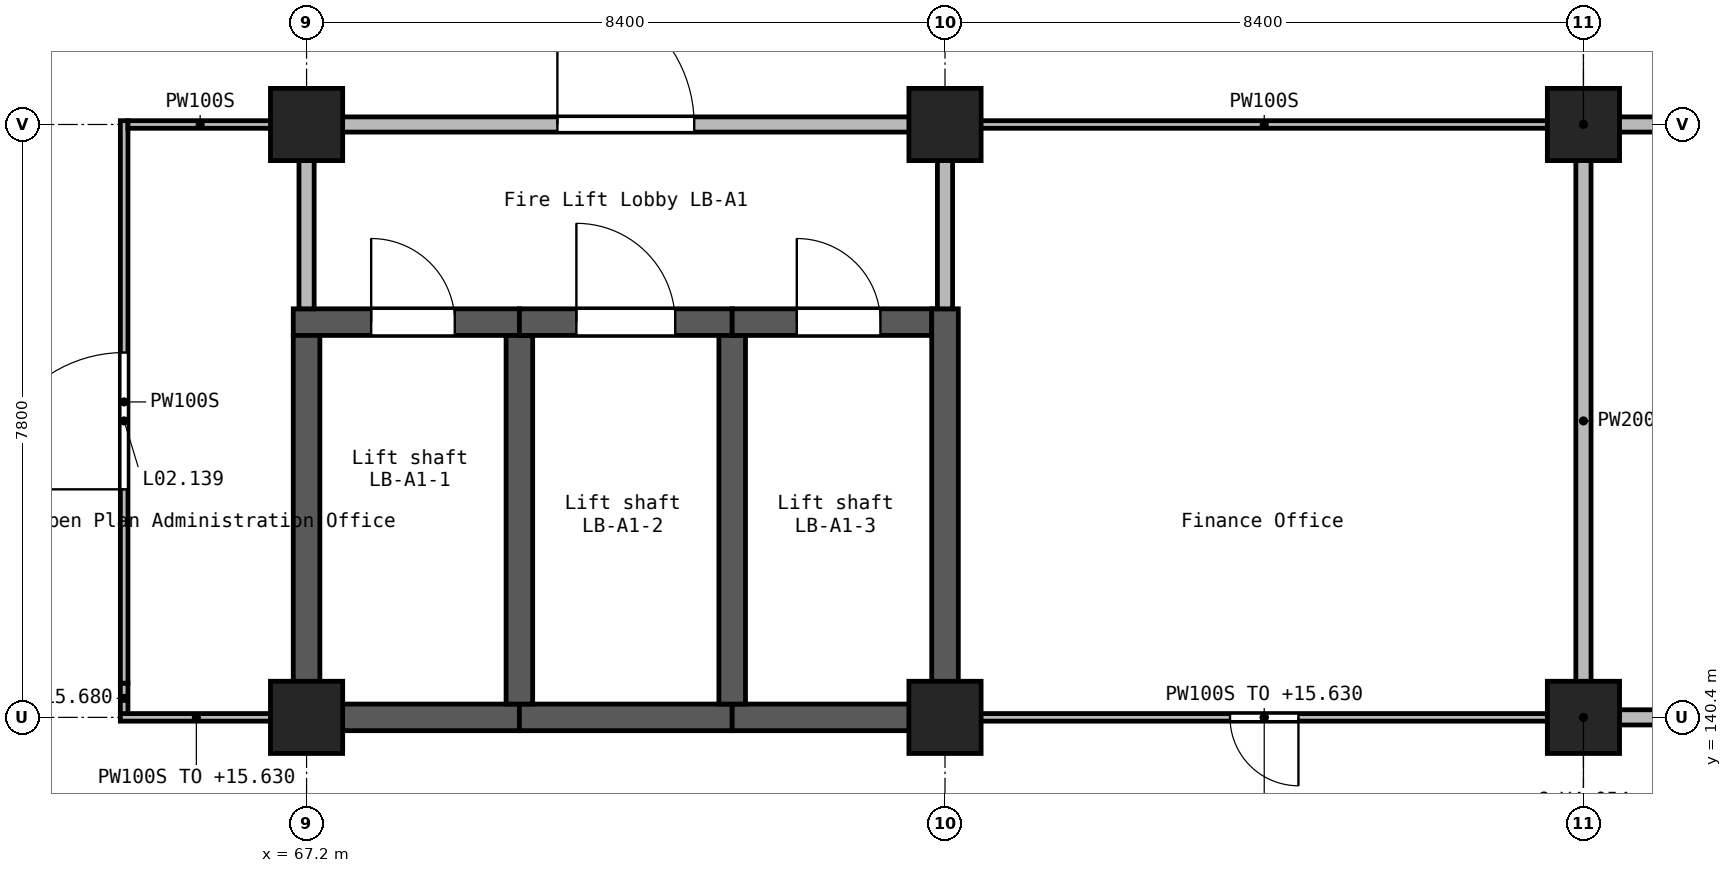
"""IFC4 building model, lengths in metres.
Left out: names, types, materials, properties, quantities, classifications, styles, units other than length and angle.
Written with IfcOpenShell. Run it as: python <this file> out.ifc"""

import sys

from ifc_helpers import new_model, si_unit, direction, frame, frame_2d, origin, origin_2d, place, context, subcontext, project, spatial, rectangle, extrude, element, fill, save


model = new_model("IFC4")
c1 = context("Model", 3, precision=1e-05, world=origin(), true_north=direction((0.0, 1.0)))
c2 = subcontext(c1, "Body", "Model", "MODEL_VIEW")
j1 = project(units=[si_unit("LENGTHUNIT", "METRE"), si_unit("PLANEANGLEUNIT", "RADIAN")], contexts=[c1])
p1 = place(None, origin())
s1 = spatial("IfcSite", under=j1, at=p1, CompositionType="ELEMENT")
p2 = place(p1, origin())
s2 = spatial("IfcBuilding", under=s1, at=p2, CompositionType="ELEMENT")
p3 = place(p2, frame((0.0, 0.0, 12.6)))
s3 = spatial("IfcBuildingStorey", under=s2, at=p3, CompositionType="ELEMENT", Elevation=12.6)
for number, where, z_axis, x_axis in (
    (1, (67.2, 140.4, 0.0), (0.0, 0.0, 1.0), (1.0, 0.0, 0.0)),
    (2, (67.2, 148.2, 0.0), (0.0, 0.0, 1.0), (1.0, 0.0, 0.0)),
    (3, (75.6, 140.4, 0.0), (0.0, 0.0, 1.0), (1.0, 0.0, 0.0)),
    (4, (75.6, 148.2, 0.0), (0.0, 0.0, 1.0), (1.0, 0.0, 0.0)),
    (5, (84.0, 140.4, 0.0), (0.0, 0.0, 1.0), (1.0, 0.0, 0.0)),
    (6, (84.0, 148.2, 0.0), (0.0, 0.0, 1.0), (1.0, 0.0, 0.0)),
):
    element("IfcColumn", number, at=place(p3, frame(where, z_axis=z_axis, x_axis=x_axis)), inside=s3, PredefinedType="COLUMN", context=c2, shape_type="SweptSolid", body=[
        extrude(rectangle(XDim=0.95, YDim=0.95, at=origin_2d()), origin(), (0.0, 0.0, 1.0), 4.2),
    ])
p4 = place(p3, frame((67.025, 145.6, 0.0), z_axis=(0.0, 0.0, 1.0), x_axis=(1.0, 0.0, 0.0)))
e7 = element("IfcWall", 7, at=p4, inside=s3, PredefinedType="SHEAR", context=c2, shape_type="SweptSolid", body=[
    extrude(rectangle(XDim=2.975, YDim=0.35, at=frame_2d((1.488, 0.0))), origin(), (0.0, 0.0, 1.0), 4.2),
])
p5 = place(p4, frame((1.025, 0.0, 0.0)))
e8 = element("IfcOpeningElement", 8, at=p5, cuts=e7, PredefinedType="OPENING", context=c2, shape_type="SweptSolid", body=[
    extrude(rectangle(XDim=1.1, YDim=2.1, at=frame_2d((0.55, 1.05))), frame((0.0, 0.185, 0.0), z_axis=(0.0, -1.0, 0.0), x_axis=(1.0, 0.0, 0.0)), (0.0, 0.0, 1.0), 0.37),
])
p6 = place(p3, frame((67.2, 140.225, 0.0), z_axis=(0.0, 0.0, 1.0), x_axis=(0.0, 1.0, 0.0)))
e9 = element("IfcWall", 9, at=p6, inside=s3, PredefinedType="SHEAR", context=c2, shape_type="SweptSolid", body=[
    extrude(rectangle(XDim=5.2, YDim=0.35, at=frame_2d((2.6, 0.0))), origin(), (0.0, 0.0, 1.0), 4.2),
])
p7 = place(p3, frame((67.375, 140.4, 0.0), z_axis=(0.0, 0.0, 1.0), x_axis=(1.0, 0.0, 0.0)))
e10 = element("IfcWall", 10, at=p7, inside=s3, PredefinedType="SHEAR", context=c2, shape_type="SweptSolid", body=[
    extrude(rectangle(XDim=2.625, YDim=0.35, at=frame_2d((1.312, 0.0))), origin(), (0.0, 0.0, 1.0), 4.2),
])
p8 = place(p3, frame((70.0, 140.4, 0.0), z_axis=(0.0, 0.0, 1.0), x_axis=(1.0, 0.0, 0.0)))
e11 = element("IfcWall", 11, at=p8, inside=s3, PredefinedType="SHEAR", context=c2, shape_type="SweptSolid", body=[
    extrude(rectangle(XDim=2.8, YDim=0.35, at=frame_2d((1.4, 0.0))), origin(), (0.0, 0.0, 1.0), 4.2),
])
p9 = place(p3, frame((70.0, 140.575, 0.0), z_axis=(0.0, 0.0, 1.0), x_axis=(0.0, 1.0, 0.0)))
e12 = element("IfcWall", 12, at=p9, inside=s3, PredefinedType="SHEAR", context=c2, shape_type="SweptSolid", body=[
    extrude(rectangle(XDim=4.85, YDim=0.35, at=frame_2d((2.425, 0.0))), origin(), (0.0, 0.0, 1.0), 4.2),
])
p10 = place(p3, frame((70.0, 145.6, 0.0), z_axis=(0.0, 0.0, 1.0), x_axis=(1.0, 0.0, 0.0)))
e13 = element("IfcWall", 13, at=p10, inside=s3, PredefinedType="SHEAR", context=c2, shape_type="SweptSolid", body=[
    extrude(rectangle(XDim=2.8, YDim=0.35, at=frame_2d((1.4, 0.0))), origin(), (0.0, 0.0, 1.0), 4.2),
])
p11 = place(p10, frame((0.75, 0.0, 0.0)))
e14 = element("IfcOpeningElement", 14, at=p11, cuts=e13, PredefinedType="OPENING", context=c2, shape_type="SweptSolid", body=[
    extrude(rectangle(XDim=1.3, YDim=2.1, at=frame_2d((0.65, 1.05))), frame((0.0, 0.185, 0.0), z_axis=(0.0, -1.0, 0.0), x_axis=(1.0, 0.0, 0.0)), (0.0, 0.0, 1.0), 0.37),
])
p12 = place(p3, frame((72.8, 140.4, 0.0), z_axis=(0.0, 0.0, 1.0), x_axis=(1.0, 0.0, 0.0)))
e15 = element("IfcWall", 15, at=p12, inside=s3, PredefinedType="SHEAR", context=c2, shape_type="SweptSolid", body=[
    extrude(rectangle(XDim=2.625, YDim=0.35, at=frame_2d((1.312, 0.0))), origin(), (0.0, 0.0, 1.0), 4.2),
])
p13 = place(p3, frame((72.8, 140.575, 0.0), z_axis=(0.0, 0.0, 1.0), x_axis=(0.0, 1.0, 0.0)))
e16 = element("IfcWall", 16, at=p13, inside=s3, PredefinedType="SHEAR", context=c2, shape_type="SweptSolid", body=[
    extrude(rectangle(XDim=4.85, YDim=0.35, at=frame_2d((2.425, 0.0))), origin(), (0.0, 0.0, 1.0), 4.2),
])
p14 = place(p3, frame((72.8, 145.6, 0.0), z_axis=(0.0, 0.0, 1.0), x_axis=(1.0, 0.0, 0.0)))
e17 = element("IfcWall", 17, at=p14, inside=s3, PredefinedType="SHEAR", context=c2, shape_type="SweptSolid", body=[
    extrude(rectangle(XDim=2.625, YDim=0.35, at=frame_2d((1.312, 0.0))), origin(), (0.0, 0.0, 1.0), 4.2),
])
p15 = place(p14, frame((0.85, 0.0, 0.0)))
e18 = element("IfcOpeningElement", 18, at=p15, cuts=e17, PredefinedType="OPENING", context=c2, shape_type="SweptSolid", body=[
    extrude(rectangle(XDim=1.1, YDim=2.1, at=frame_2d((0.55, 1.05))), frame((0.0, 0.185, 0.0), z_axis=(0.0, -1.0, 0.0), x_axis=(1.0, 0.0, 0.0)), (0.0, 0.0, 1.0), 0.37),
])
p16 = place(p3, frame((75.6, 140.225, 0.0), z_axis=(0.0, 0.0, 1.0), x_axis=(0.0, 1.0, 0.0)))
e19 = element("IfcWall", 19, at=p16, inside=s3, PredefinedType="SHEAR", context=c2, shape_type="SweptSolid", body=[
    extrude(rectangle(XDim=5.55, YDim=0.35, at=frame_2d((2.775, 0.0))), origin(), (0.0, 0.0, 1.0), 4.2),
])
p17 = place(p3, frame((84.45, 140.4, 0.0), z_axis=(0.0, 0.0, 1.0), x_axis=(1.0, 0.0, 0.0)))
e20 = element("IfcWall", 20, at=p17, inside=s3, PredefinedType="SOLIDWALL", context=c2, shape_type="SweptSolid", body=[
    extrude(rectangle(XDim=7.5, YDim=0.2, at=frame_2d((3.75, 0.0))), origin(), (0.0, 0.0, 1.0), 3.03),
])
p18 = place(p17, frame((4.45, 0.0, 0.0)))
e21 = element("IfcOpeningElement", 21, at=p18, cuts=e20, PredefinedType="OPENING", context=c2, shape_type="SweptSolid", body=[
    extrude(rectangle(XDim=1.0, YDim=2.1, at=frame_2d((0.5, 1.05))), frame((0.0, 0.11, 0.0), z_axis=(0.0, -1.0, 0.0), x_axis=(1.0, 0.0, 0.0)), (0.0, 0.0, 1.0), 0.22),
])
p19 = place(p3, frame((84.45, 148.2, 0.0), z_axis=(0.0, 0.0, 1.0), x_axis=(1.0, 0.0, 0.0)))
e22 = element("IfcWall", 22, at=p19, inside=s3, PredefinedType="SOLIDWALL", context=c2, shape_type="SweptSolid", body=[
    extrude(rectangle(XDim=7.5, YDim=0.2, at=frame_2d((3.75, 0.0))), origin(), (0.0, 0.0, 1.0), 3.85),
])
p20 = place(p3, frame((67.65, 148.2, 0.0), z_axis=(0.0, 0.0, 1.0), x_axis=(1.0, 0.0, 0.0)))
e23 = element("IfcWall", 23, at=p20, inside=s3, PredefinedType="SOLIDWALL", context=c2, shape_type="SweptSolid", body=[
    extrude(rectangle(XDim=7.5, YDim=0.2, at=frame_2d((3.75, 0.0))), origin(), (0.0, 0.0, 1.0), 3.85),
])
p21 = place(p20, frame((2.85, 0.0, 0.0)))
e24 = element("IfcOpeningElement", 24, at=p21, cuts=e23, PredefinedType="OPENING", context=c2, shape_type="SweptSolid", body=[
    extrude(rectangle(XDim=1.8, YDim=2.1, at=frame_2d((0.9, 1.05))), frame((0.0, 0.11, 0.0), z_axis=(0.0, -1.0, 0.0), x_axis=(1.0, 0.0, 0.0)), (0.0, 0.0, 1.0), 0.22),
])
p22 = place(p3, frame((84.0, 140.85, 0.0), z_axis=(0.0, 0.0, 1.0), x_axis=(0.0, 1.0, 0.0)))
e25 = element("IfcWall", 25, at=p22, inside=s3, PredefinedType="SOLIDWALL", context=c2, shape_type="SweptSolid", body=[
    extrude(rectangle(XDim=6.9, YDim=0.2, at=frame_2d((3.45, 0.0))), origin(), (0.0, 0.0, 1.0), 3.85),
])
for number, where, z_axis, x_axis in (
    (26, (67.2, 145.775, 0.0), (0.0, 0.0, 1.0), (0.0, 1.0, 0.0)),
    (27, (75.6, 145.775, 0.0), (0.0, 0.0, 1.0), (0.0, 1.0, 0.0)),
):
    element("IfcWall", number, at=place(p3, frame(where, z_axis=z_axis, x_axis=x_axis)), inside=s3, PredefinedType="SOLIDWALL", context=c2, shape_type="SweptSolid", body=[
        extrude(rectangle(XDim=1.975, YDim=0.2, at=frame_2d((0.988, 0.0))), origin(), (0.0, 0.0, 1.0), 3.85),
    ])
p23 = place(p3, frame((83.55, 140.4, 0.0), z_axis=(0.0, 0.0, 1.0), x_axis=(-1.0, 0.0, 0.0)))
e28 = element("IfcWall", 28, at=p23, inside=s3, PredefinedType="PARTITIONING", context=c2, shape_type="SweptSolid", body=[
    extrude(rectangle(XDim=7.5, YDim=0.1, at=frame_2d((3.75, 0.0))), origin(), (0.0, 0.0, 1.0), 3.03),
])
p24 = place(p23, frame((3.3, 0.0, 0.0)))
e29 = element("IfcOpeningElement", 29, at=p24, cuts=e28, PredefinedType="OPENING", context=c2, shape_type="SweptSolid", body=[
    extrude(rectangle(XDim=0.9, YDim=2.1, at=frame_2d((0.45, 1.05))), frame((0.0, 0.06, 0.0), z_axis=(0.0, -1.0, 0.0), x_axis=(1.0, 0.0, 0.0)), (0.0, 0.0, 1.0), 0.12),
])
p25 = place(p3, frame((66.75, 140.4, 0.0), z_axis=(0.0, 0.0, 1.0), x_axis=(-1.0, 0.0, 0.0)))
e30 = element("IfcWall", 30, at=p25, inside=s3, PredefinedType="PARTITIONING", context=c2, shape_type="SweptSolid", body=[
    extrude(rectangle(XDim=2.0, YDim=0.1, at=frame_2d((1.0, 0.0))), origin(), (0.0, 0.0, 1.0), 3.03),
])
p26 = place(p3, frame((76.05, 148.2, 0.0), z_axis=(0.0, 0.0, 1.0), x_axis=(1.0, 0.0, 0.0)))
e31 = element("IfcWall", 31, at=p26, inside=s3, PredefinedType="PARTITIONING", context=c2, shape_type="SweptSolid", body=[
    extrude(rectangle(XDim=7.5, YDim=0.1, at=frame_2d((3.75, 0.0))), origin(), (0.0, 0.0, 1.0), 3.85),
])
p27 = place(p3, frame((64.8, 140.45, 0.0), z_axis=(0.0, 0.0, 1.0), x_axis=(0.0, 1.0, 0.0)))
e32 = element("IfcWall", 32, at=p27, inside=s3, PredefinedType="PARTITIONING", context=c2, shape_type="SweptSolid", body=[
    extrude(rectangle(XDim=0.4, YDim=0.1, at=frame_2d((0.2, 0.0))), origin(), (0.0, 0.0, 1.0), 3.08),
])
p28 = place(p3, frame((64.8, 140.85, 0.0), z_axis=(0.0, 0.0, 1.0), x_axis=(0.0, 1.0, 0.0)))
e33 = element("IfcWall", 33, at=p28, inside=s3, PredefinedType="PARTITIONING", context=c2, shape_type="SweptSolid", body=[
    extrude(rectangle(XDim=7.4, YDim=0.1, at=frame_2d((3.7, 0.0))), origin(), (0.0, 0.0, 1.0), 3.85),
])
p29 = place(p28, frame((2.55, 0.0, 0.0)))
e34 = element("IfcOpeningElement", 34, at=p29, cuts=e33, PredefinedType="OPENING", context=c2, shape_type="SweptSolid", body=[
    extrude(rectangle(XDim=1.8, YDim=2.1, at=frame_2d((0.9, 1.05))), frame((0.0, 0.06, 0.0), z_axis=(0.0, -1.0, 0.0), x_axis=(1.0, 0.0, 0.0)), (0.0, 0.0, 1.0), 0.12),
])
p30 = place(p3, frame((64.85, 148.2, 0.0), z_axis=(0.0, 0.0, 1.0), x_axis=(1.0, 0.0, 0.0)))
e35 = element("IfcWall", 35, at=p30, inside=s3, PredefinedType="PARTITIONING", context=c2, shape_type="SweptSolid", body=[
    extrude(rectangle(XDim=1.9, YDim=0.1, at=frame_2d((0.95, 0.0))), origin(), (0.0, 0.0, 1.0), 3.85),
])
p31 = place(p21, frame((1.8, 0.0, 0.0), z_axis=(0.0, 0.0, 1.0), x_axis=(-1.0, 0.0, 0.0)))
e36 = element("IfcDoor", 36, at=p31, inside=s3, OperationType="DOUBLE_DOOR_SINGLE_SWING", PredefinedType="DOOR", context=c2, shape_type="SweptSolid", body=[
    extrude(rectangle(XDim=1.8, YDim=2.1, at=frame_2d((0.9, 1.05))), frame((0.0, 0.025, 0.0), z_axis=(0.0, -1.0, 0.0), x_axis=(1.0, 0.0, 0.0)), (0.0, 0.0, 1.0), 0.05),
])
fill(e24, e36)
p32 = place(p29, frame((1.8, 0.0, 0.0), z_axis=(0.0, 0.0, 1.0), x_axis=(-1.0, 0.0, 0.0)))
e37 = element("IfcDoor", 37, at=p32, inside=s3, OperationType="DOUBLE_DOOR_SINGLE_SWING", PredefinedType="DOOR", context=c2, shape_type="SweptSolid", body=[
    extrude(rectangle(XDim=1.8, YDim=2.1, at=frame_2d((0.9, 1.05))), frame((0.0, 0.025, 0.0), z_axis=(0.0, -1.0, 0.0), x_axis=(1.0, 0.0, 0.0)), (0.0, 0.0, 1.0), 0.05),
])
fill(e34, e37)
p33 = place(p24, frame((0.9, 0.0, 0.0), z_axis=(0.0, 0.0, 1.0), x_axis=(-1.0, 0.0, 0.0)))
e38 = element("IfcDoor", 38, at=p33, inside=s3, OperationType="SINGLE_SWING_RIGHT", PredefinedType="DOOR", context=c2, shape_type="SweptSolid", body=[
    extrude(rectangle(XDim=0.9, YDim=2.1, at=frame_2d((0.45, 1.05))), frame((0.0, 0.025, 0.0), z_axis=(0.0, -1.0, 0.0), x_axis=(1.0, 0.0, 0.0)), (0.0, 0.0, 1.0), 0.05),
])
fill(e29, e38)
p34 = place(p5, origin())
e39 = element("IfcDoor", 39, at=p34, inside=s3, OperationType="DOUBLE_DOOR_SLIDING", PredefinedType="DOOR", context=c2, shape_type="SweptSolid", body=[
    extrude(rectangle(XDim=1.1, YDim=2.1, at=frame_2d((0.55, 1.05))), frame((0.0, 0.025, 0.0), z_axis=(0.0, -1.0, 0.0), x_axis=(1.0, 0.0, 0.0)), (0.0, 0.0, 1.0), 0.05),
])
fill(e8, e39)
p35 = place(p11, origin())
e40 = element("IfcDoor", 40, at=p35, inside=s3, OperationType="DOUBLE_DOOR_SLIDING", PredefinedType="DOOR", context=c2, shape_type="SweptSolid", body=[
    extrude(rectangle(XDim=1.3, YDim=2.1, at=frame_2d((0.65, 1.05))), frame((0.0, 0.025, 0.0), z_axis=(0.0, -1.0, 0.0), x_axis=(1.0, 0.0, 0.0)), (0.0, 0.0, 1.0), 0.05),
])
fill(e14, e40)
p36 = place(p15, origin())
e41 = element("IfcDoor", 41, at=p36, inside=s3, OperationType="DOUBLE_DOOR_SLIDING", PredefinedType="DOOR", context=c2, shape_type="SweptSolid", body=[
    extrude(rectangle(XDim=1.1, YDim=2.1, at=frame_2d((0.55, 1.05))), frame((0.0, 0.025, 0.0), z_axis=(0.0, -1.0, 0.0), x_axis=(1.0, 0.0, 0.0)), (0.0, 0.0, 1.0), 0.05),
])
fill(e18, e41)
save(model, sys.argv[1])
